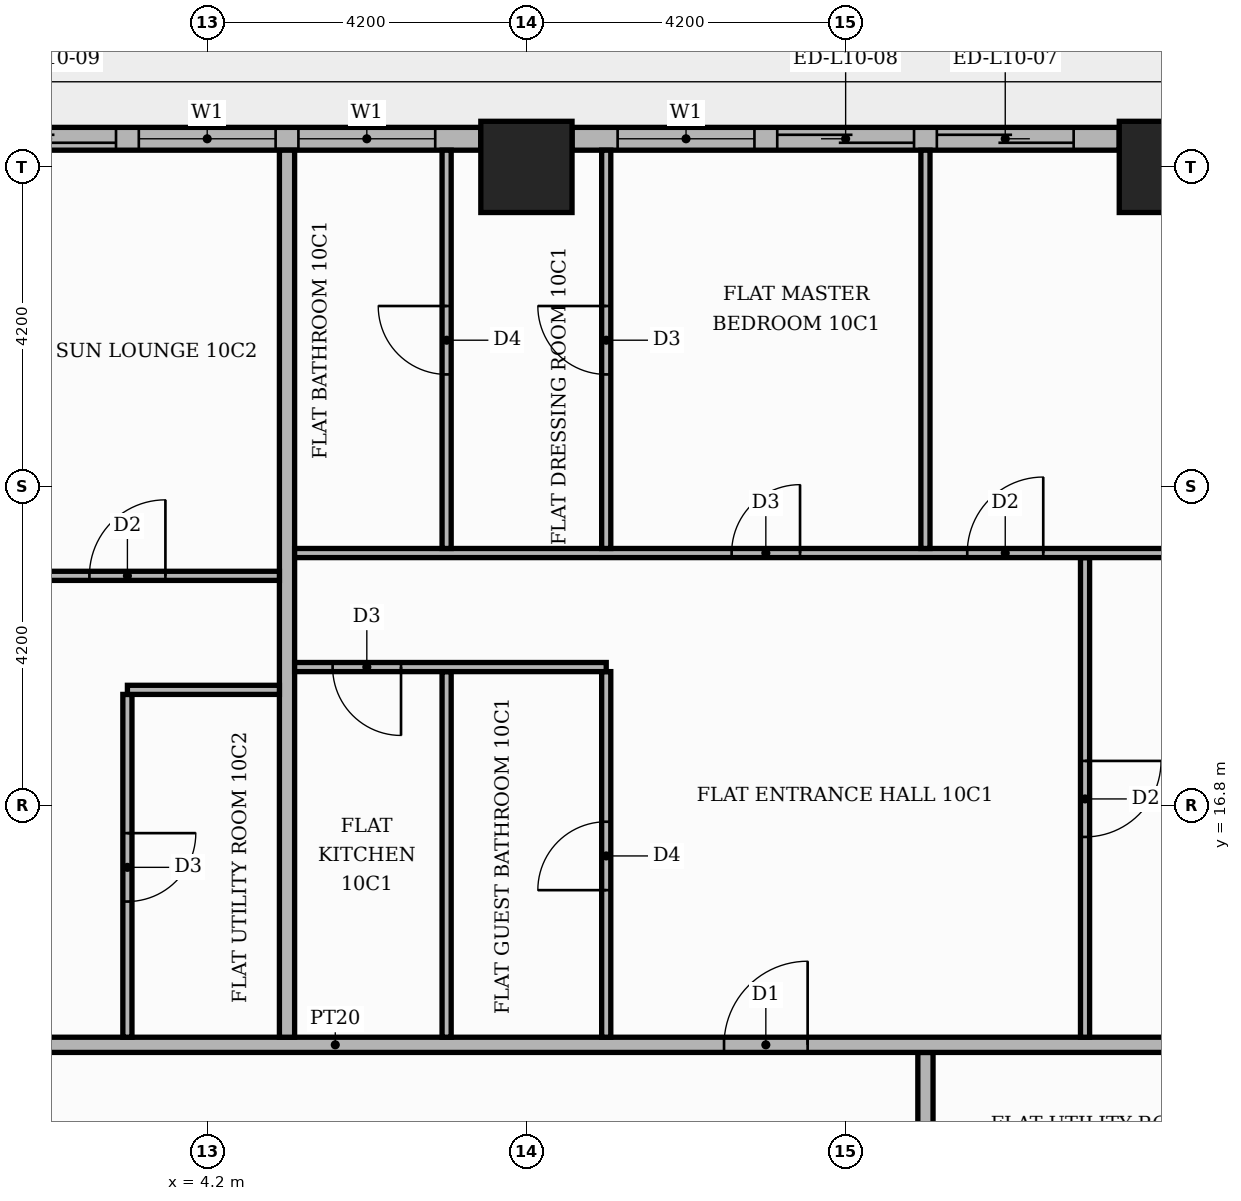
"""IFC4 building model, lengths in metres.
Left out: names, types, materials, properties, quantities, classifications, styles, units other than length and angle.
Written with IfcOpenShell. Run it as: python <this file> out.ifc"""

import sys

from ifc_helpers import new_model, si_unit, direction, frame, frame_2d, origin, origin_2d, place, context, subcontext, project, spatial, rectangle, extrude, element, fill, save


model = new_model("IFC4")
c1 = context("Model", 3, precision=1e-05, world=origin(), true_north=direction((0.0, 1.0)))
c2 = subcontext(c1, "Body", "Model", "MODEL_VIEW")
j1 = project(units=[si_unit("LENGTHUNIT", "METRE"), si_unit("PLANEANGLEUNIT", "RADIAN")], contexts=[c1])
p1 = place(None, origin())
s1 = spatial("IfcSite", under=j1, at=p1, CompositionType="ELEMENT")
p2 = place(p1, origin())
s2 = spatial("IfcBuilding", under=s1, at=p2, CompositionType="ELEMENT")
p3 = place(p2, frame((0.0, 0.0, 46.5)))
s3 = spatial("IfcBuildingStorey", under=s2, at=p3, CompositionType="ELEMENT", Elevation=46.5)
for number, where, z_axis, x_axis in (
    (1, (8.4, 25.2, 0.0), (0.0, 0.0, 1.0), (1.0, 0.0, 0.0)),
    (2, (16.8, 25.2, 0.0), (0.0, 0.0, 1.0), (1.0, 0.0, 0.0)),
):
    element("IfcColumn", number, at=place(p3, frame(where, z_axis=z_axis, x_axis=x_axis)), inside=s3, PredefinedType="COLUMN", context=c2, shape_type="SweptSolid", body=[
        extrude(rectangle(XDim=1.2, YDim=1.2, at=origin_2d()), origin(), (0.0, 0.0, 1.0), 3.9),
    ])
p4 = place(p3, frame((16.2, 25.57, 0.0), z_axis=(0.0, 0.0, 1.0), x_axis=(-1.0, 0.0, 0.0)))
e3 = element("IfcWall", 3, at=p4, inside=s3, PredefinedType="STANDARD", context=c2, shape_type="SweptSolid", body=[
    extrude(rectangle(XDim=7.2, YDim=0.3, at=frame_2d((3.6, 0.0))), origin(), (0.0, 0.0, 1.0), 3.48),
])
p5 = place(p4, frame((0.6, 0.0, 0.0)))
e4 = element("IfcOpeningElement", 4, at=p5, cuts=e3, PredefinedType="OPENING", context=c2, shape_type="SweptSolid", body=[
    extrude(rectangle(XDim=1.8, YDim=2.4, at=frame_2d((0.9, 1.2))), frame((0.0, 0.16, 0.0), z_axis=(0.0, -1.0, 0.0), x_axis=(1.0, 0.0, 0.0)), (0.0, 0.0, 1.0), 0.32),
])
p6 = place(p4, frame((2.7, 0.0, 0.0)))
e5 = element("IfcOpeningElement", 5, at=p6, cuts=e3, PredefinedType="OPENING", context=c2, shape_type="SweptSolid", body=[
    extrude(rectangle(XDim=1.8, YDim=2.4, at=frame_2d((0.9, 1.2))), frame((0.0, 0.16, 0.0), z_axis=(0.0, -1.0, 0.0), x_axis=(1.0, 0.0, 0.0)), (0.0, 0.0, 1.0), 0.32),
])
p7 = place(p4, frame((4.8, 0.0, 0.9)))
e6 = element("IfcOpeningElement", 6, at=p7, cuts=e3, PredefinedType="OPENING", context=c2, shape_type="SweptSolid", body=[
    extrude(rectangle(XDim=1.8, YDim=2.1, at=frame_2d((0.9, 1.05))), frame((0.0, 0.16, 0.0), z_axis=(0.0, -1.0, 0.0), x_axis=(1.0, 0.0, 0.0)), (0.0, 0.0, 1.0), 0.32),
])
p8 = place(p3, frame((7.8, 25.57, 0.0), z_axis=(0.0, 0.0, 1.0), x_axis=(-1.0, 0.0, 0.0)))
e7 = element("IfcWall", 7, at=p8, inside=s3, PredefinedType="STANDARD", context=c2, shape_type="SweptSolid", body=[
    extrude(rectangle(XDim=7.2, YDim=0.3, at=frame_2d((3.6, 0.0))), origin(), (0.0, 0.0, 1.0), 3.48),
])
p9 = place(p8, frame((0.6, 0.0, 0.9)))
e8 = element("IfcOpeningElement", 8, at=p9, cuts=e7, PredefinedType="OPENING", context=c2, shape_type="SweptSolid", body=[
    extrude(rectangle(XDim=1.8, YDim=2.1, at=frame_2d((0.9, 1.05))), frame((0.0, 0.16, 0.0), z_axis=(0.0, -1.0, 0.0), x_axis=(1.0, 0.0, 0.0)), (0.0, 0.0, 1.0), 0.32),
])
p10 = place(p8, frame((2.7, 0.0, 0.9)))
e9 = element("IfcOpeningElement", 9, at=p10, cuts=e7, PredefinedType="OPENING", context=c2, shape_type="SweptSolid", body=[
    extrude(rectangle(XDim=1.8, YDim=2.1, at=frame_2d((0.9, 1.05))), frame((0.0, 0.16, 0.0), z_axis=(0.0, -1.0, 0.0), x_axis=(1.0, 0.0, 0.0)), (0.0, 0.0, 1.0), 0.32),
])
p11 = place(p8, frame((4.8, 0.0, 0.0)))
e10 = element("IfcOpeningElement", 10, at=p11, cuts=e7, PredefinedType="OPENING", context=c2, shape_type="SweptSolid", body=[
    extrude(rectangle(XDim=1.8, YDim=2.4, at=frame_2d((0.9, 1.2))), frame((0.0, 0.16, 0.0), z_axis=(0.0, -1.0, 0.0), x_axis=(1.0, 0.0, 0.0)), (0.0, 0.0, 1.0), 0.32),
])
p12 = place(p3, frame((13.65, -13.55, 0.0), z_axis=(0.0, 0.0, 1.0), x_axis=(0.0, 1.0, 0.0)))
e11 = element("IfcWall", 11, at=p12, inside=s3, PredefinedType="PARTITIONING", context=c2, shape_type="SweptSolid", body=[
    extrude(rectangle(XDim=27.1, YDim=0.2, at=frame_2d((13.55, 0.0))), origin(), (0.0, 0.0, 1.0), 3.48),
])
p13 = place(p12, frame((2.5, 0.0, 0.0)))
e12 = element("IfcOpeningElement", 12, at=p13, cuts=e11, PredefinedType="OPENING", context=c2, shape_type="SweptSolid", body=[
    extrude(rectangle(XDim=1.1, YDim=2.4, at=frame_2d((0.55, 1.2))), frame((0.0, 0.11, 0.0), z_axis=(0.0, -1.0, 0.0), x_axis=(1.0, 0.0, 0.0)), (0.0, 0.0, 1.0), 0.22),
])
p14 = place(p3, frame((-13.65, 13.65, 0.0), z_axis=(0.0, 0.0, 1.0), x_axis=(1.0, 0.0, 0.0)))
e13 = element("IfcWall", 13, at=p14, inside=s3, PredefinedType="PARTITIONING", context=c2, shape_type="SweptSolid", body=[
    extrude(rectangle(XDim=39.07, YDim=0.2, at=frame_2d((19.535, 0.0))), origin(), (0.0, 0.0, 1.0), 3.48),
])
p15 = place(p14, frame((24.65, 0.0, 0.0)))
e14 = element("IfcOpeningElement", 14, at=p15, cuts=e13, PredefinedType="OPENING", context=c2, shape_type="SweptSolid", body=[
    extrude(rectangle(XDim=1.1, YDim=2.4, at=frame_2d((0.55, 1.2))), frame((0.0, 0.11, 0.0), z_axis=(0.0, -1.0, 0.0), x_axis=(1.0, 0.0, 0.0)), (0.0, 0.0, 1.0), 0.22),
])
p16 = place(p14, frame((14.15, 0.0, 0.0)))
e15 = element("IfcOpeningElement", 15, at=p16, cuts=e13, PredefinedType="OPENING", context=c2, shape_type="SweptSolid", body=[
    extrude(rectangle(XDim=1.1, YDim=2.4, at=frame_2d((0.55, 1.2))), frame((0.0, 0.11, 0.0), z_axis=(0.0, -1.0, 0.0), x_axis=(1.0, 0.0, 0.0)), (0.0, 0.0, 1.0), 0.22),
])
p17 = place(p3, frame((3.15, 13.75, 0.0), z_axis=(0.0, 0.0, 1.0), x_axis=(0.0, 1.0, 0.0)))
e16 = element("IfcWall", 16, at=p17, inside=s3, PredefinedType="PARTITIONING", context=c2, shape_type="SweptSolid", body=[
    extrude(rectangle(XDim=4.51, YDim=0.12, at=frame_2d((2.255, 0.0))), origin(), (0.0, 0.0, 1.0), 3.48),
])
p18 = place(p17, frame((1.785, 0.0, 0.0)))
e17 = element("IfcOpeningElement", 17, at=p18, cuts=e16, PredefinedType="OPENING", context=c2, shape_type="SweptSolid", body=[
    extrude(rectangle(XDim=0.9, YDim=2.1, at=frame_2d((0.45, 1.05))), frame((0.0, 0.07, 0.0), z_axis=(0.0, -1.0, 0.0), x_axis=(1.0, 0.0, 0.0)), (0.0, 0.0, 1.0), 0.14),
])
p19 = place(p3, frame((5.25, 13.75, 0.0), z_axis=(0.0, 0.0, 1.0), x_axis=(0.0, 1.0, 0.0)))
e18 = element("IfcWall", 18, at=p19, inside=s3, PredefinedType="PARTITIONING", context=c2, shape_type="SweptSolid", body=[
    extrude(rectangle(XDim=11.67, YDim=0.2, at=frame_2d((5.835, 0.0))), origin(), (0.0, 0.0, 1.0), 3.48),
])
p20 = place(p3, frame((7.35, 13.75, 0.0), z_axis=(0.0, 0.0, 1.0), x_axis=(0.0, 1.0, 0.0)))
e19 = element("IfcWall", 19, at=p20, inside=s3, PredefinedType="PARTITIONING", context=c2, shape_type="SweptSolid", body=[
    extrude(rectangle(XDim=4.81, YDim=0.12, at=frame_2d((2.405, 0.0))), origin(), (0.0, 0.0, 1.0), 3.48),
])
p21 = place(p3, frame((9.45, 13.75, 0.0), z_axis=(0.0, 0.0, 1.0), x_axis=(0.0, 1.0, 0.0)))
e20 = element("IfcWall", 20, at=p21, inside=s3, PredefinedType="PARTITIONING", context=c2, shape_type="SweptSolid", body=[
    extrude(rectangle(XDim=4.81, YDim=0.12, at=frame_2d((2.405, 0.0))), origin(), (0.0, 0.0, 1.0), 3.48),
])
p22 = place(p21, frame((1.935, 0.0, 0.0)))
e21 = element("IfcOpeningElement", 21, at=p22, cuts=e20, PredefinedType="OPENING", context=c2, shape_type="SweptSolid", body=[
    extrude(rectangle(XDim=0.9, YDim=2.1, at=frame_2d((0.45, 1.05))), frame((0.0, 0.07, 0.0), z_axis=(0.0, -1.0, 0.0), x_axis=(1.0, 0.0, 0.0)), (0.0, 0.0, 1.0), 0.14),
])
p23 = place(p3, frame((15.75, 13.75, 0.0), z_axis=(0.0, 0.0, 1.0), x_axis=(0.0, 1.0, 0.0)))
e22 = element("IfcWall", 22, at=p23, inside=s3, PredefinedType="PARTITIONING", context=c2, shape_type="SweptSolid", body=[
    extrude(rectangle(XDim=6.31, YDim=0.12, at=frame_2d((3.155, 0.0))), origin(), (0.0, 0.0, 1.0), 3.48),
])
p24 = place(p23, frame((2.635, 0.0, 0.0)))
e23 = element("IfcOpeningElement", 23, at=p24, cuts=e22, PredefinedType="OPENING", context=c2, shape_type="SweptSolid", body=[
    extrude(rectangle(XDim=1.0, YDim=2.1, at=frame_2d((0.5, 1.05))), frame((0.0, 0.07, 0.0), z_axis=(0.0, -1.0, 0.0), x_axis=(1.0, 0.0, 0.0)), (0.0, 0.0, 1.0), 0.14),
])
p25 = place(p3, frame((3.15, 18.32, 0.0), z_axis=(0.0, 0.0, 1.0), x_axis=(1.0, 0.0, 0.0)))
e24 = element("IfcWall", 24, at=p25, inside=s3, PredefinedType="PARTITIONING", context=c2, shape_type="SweptSolid", body=[
    extrude(rectangle(XDim=2.0, YDim=0.12, at=frame_2d((1.0, 0.0))), origin(), (0.0, 0.0, 1.0), 3.48),
])
p26 = place(p3, frame((5.35, 18.62, 0.0), z_axis=(0.0, 0.0, 1.0), x_axis=(1.0, 0.0, 0.0)))
e25 = element("IfcWall", 25, at=p26, inside=s3, PredefinedType="PARTITIONING", context=c2, shape_type="SweptSolid", body=[
    extrude(rectangle(XDim=4.1, YDim=0.12, at=frame_2d((2.05, 0.0))), origin(), (0.0, 0.0, 1.0), 3.48),
])
p27 = place(p26, frame((0.5, 0.0, 0.0)))
e26 = element("IfcOpeningElement", 26, at=p27, cuts=e25, PredefinedType="OPENING", context=c2, shape_type="SweptSolid", body=[
    extrude(rectangle(XDim=0.9, YDim=2.1, at=frame_2d((0.45, 1.05))), frame((0.0, 0.07, 0.0), z_axis=(0.0, -1.0, 0.0), x_axis=(1.0, 0.0, 0.0)), (0.0, 0.0, 1.0), 0.14),
])
p28 = place(p3, frame((-13.55, 19.82, 0.0), z_axis=(0.0, 0.0, 1.0), x_axis=(1.0, 0.0, 0.0)))
e27 = element("IfcWall", 27, at=p28, inside=s3, PredefinedType="PARTITIONING", context=c2, shape_type="SweptSolid", body=[
    extrude(rectangle(XDim=18.7, YDim=0.12, at=frame_2d((9.35, 0.0))), origin(), (0.0, 0.0, 1.0), 3.48),
])
p29 = place(p28, frame((16.2, 0.0, 0.0)))
e28 = element("IfcOpeningElement", 28, at=p29, cuts=e27, PredefinedType="OPENING", context=c2, shape_type="SweptSolid", body=[
    extrude(rectangle(XDim=1.0, YDim=2.1, at=frame_2d((0.5, 1.05))), frame((0.0, 0.07, 0.0), z_axis=(0.0, -1.0, 0.0), x_axis=(1.0, 0.0, 0.0)), (0.0, 0.0, 1.0), 0.14),
])
p30 = place(p28, frame((12.05, 0.0, 0.0)))
e29 = element("IfcOpeningElement", 29, at=p30, cuts=e27, PredefinedType="OPENING", context=c2, shape_type="SweptSolid", body=[
    extrude(rectangle(XDim=0.9, YDim=2.1, at=frame_2d((0.45, 1.05))), frame((0.0, 0.07, 0.0), z_axis=(0.0, -1.0, 0.0), x_axis=(1.0, 0.0, 0.0)), (0.0, 0.0, 1.0), 0.14),
])
p31 = place(p28, frame((3.65, 0.0, 0.0)))
e30 = element("IfcOpeningElement", 30, at=p31, cuts=e27, PredefinedType="OPENING", context=c2, shape_type="SweptSolid", body=[
    extrude(rectangle(XDim=0.9, YDim=2.1, at=frame_2d((0.45, 1.05))), frame((0.0, 0.07, 0.0), z_axis=(0.0, -1.0, 0.0), x_axis=(1.0, 0.0, 0.0)), (0.0, 0.0, 1.0), 0.14),
])
p32 = place(p3, frame((5.35, 20.12, 0.0), z_axis=(0.0, 0.0, 1.0), x_axis=(1.0, 0.0, 0.0)))
e31 = element("IfcWall", 31, at=p32, inside=s3, PredefinedType="PARTITIONING", context=c2, shape_type="SweptSolid", body=[
    extrude(rectangle(XDim=11.95, YDim=0.12, at=frame_2d((5.975, 0.0))), origin(), (0.0, 0.0, 1.0), 3.48),
])
p33 = place(p32, frame((8.85, 0.0, 0.0)))
e32 = element("IfcOpeningElement", 32, at=p33, cuts=e31, PredefinedType="OPENING", context=c2, shape_type="SweptSolid", body=[
    extrude(rectangle(XDim=1.0, YDim=2.1, at=frame_2d((0.5, 1.05))), frame((0.0, 0.07, 0.0), z_axis=(0.0, -1.0, 0.0), x_axis=(1.0, 0.0, 0.0)), (0.0, 0.0, 1.0), 0.14),
])
p34 = place(p32, frame((5.75, 0.0, 0.0)))
e33 = element("IfcOpeningElement", 33, at=p34, cuts=e31, PredefinedType="OPENING", context=c2, shape_type="SweptSolid", body=[
    extrude(rectangle(XDim=0.9, YDim=2.1, at=frame_2d((0.45, 1.05))), frame((0.0, 0.07, 0.0), z_axis=(0.0, -1.0, 0.0), x_axis=(1.0, 0.0, 0.0)), (0.0, 0.0, 1.0), 0.14),
])
p35 = place(p3, frame((7.35, 20.18, 0.0), z_axis=(0.0, 0.0, 1.0), x_axis=(0.0, 1.0, 0.0)))
e34 = element("IfcWall", 34, at=p35, inside=s3, PredefinedType="PARTITIONING", context=c2, shape_type="SweptSolid", body=[
    extrude(rectangle(XDim=5.24, YDim=0.12, at=frame_2d((2.62, 0.0))), origin(), (0.0, 0.0, 1.0), 3.48),
])
p36 = place(p35, frame((2.29, 0.0, 0.0)))
e35 = element("IfcOpeningElement", 35, at=p36, cuts=e34, PredefinedType="OPENING", context=c2, shape_type="SweptSolid", body=[
    extrude(rectangle(XDim=0.9, YDim=2.1, at=frame_2d((0.45, 1.05))), frame((0.0, 0.07, 0.0), z_axis=(0.0, -1.0, 0.0), x_axis=(1.0, 0.0, 0.0)), (0.0, 0.0, 1.0), 0.14),
])
p37 = place(p3, frame((9.45, 20.18, 0.0), z_axis=(0.0, 0.0, 1.0), x_axis=(0.0, 1.0, 0.0)))
e36 = element("IfcWall", 36, at=p37, inside=s3, PredefinedType="PARTITIONING", context=c2, shape_type="SweptSolid", body=[
    extrude(rectangle(XDim=5.24, YDim=0.12, at=frame_2d((2.62, 0.0))), origin(), (0.0, 0.0, 1.0), 3.48),
])
p38 = place(p37, frame((2.29, 0.0, 0.0)))
e37 = element("IfcOpeningElement", 37, at=p38, cuts=e36, PredefinedType="OPENING", context=c2, shape_type="SweptSolid", body=[
    extrude(rectangle(XDim=0.9, YDim=2.1, at=frame_2d((0.45, 1.05))), frame((0.0, 0.07, 0.0), z_axis=(0.0, -1.0, 0.0), x_axis=(1.0, 0.0, 0.0)), (0.0, 0.0, 1.0), 0.14),
])
p39 = place(p3, frame((13.65, 20.18, 0.0), z_axis=(0.0, 0.0, 1.0), x_axis=(0.0, 1.0, 0.0)))
e38 = element("IfcWall", 38, at=p39, inside=s3, PredefinedType="PARTITIONING", context=c2, shape_type="SweptSolid", body=[
    extrude(rectangle(XDim=5.24, YDim=0.12, at=frame_2d((2.62, 0.0))), origin(), (0.0, 0.0, 1.0), 3.48),
])
p40 = place(p5, origin())
e39 = element("IfcDoor", 39, at=p40, inside=s3, OperationType="SLIDING_TO_LEFT", PredefinedType="DOOR", context=c2, shape_type="SweptSolid", body=[
    extrude(rectangle(XDim=1.8, YDim=2.4, at=frame_2d((0.9, 1.2))), frame((0.0, 0.025, 0.0), z_axis=(0.0, -1.0, 0.0), x_axis=(1.0, 0.0, 0.0)), (0.0, 0.0, 1.0), 0.05),
])
fill(e4, e39)
p41 = place(p6, origin())
e40 = element("IfcDoor", 40, at=p41, inside=s3, OperationType="SLIDING_TO_RIGHT", PredefinedType="DOOR", context=c2, shape_type="SweptSolid", body=[
    extrude(rectangle(XDim=1.8, YDim=2.4, at=frame_2d((0.9, 1.2))), frame((0.0, 0.025, 0.0), z_axis=(0.0, -1.0, 0.0), x_axis=(1.0, 0.0, 0.0)), (0.0, 0.0, 1.0), 0.05),
])
fill(e5, e40)
p42 = place(p7, origin())
e41 = element("IfcWindow", 41, at=p42, inside=s3, PartitioningType="SINGLE_PANEL", PredefinedType="WINDOW", context=c2, shape_type="SweptSolid", body=[
    extrude(rectangle(XDim=1.8, YDim=2.1, at=frame_2d((0.9, 1.05))), frame((0.0, 0.03, 0.0), z_axis=(0.0, -1.0, 0.0), x_axis=(1.0, 0.0, 0.0)), (0.0, 0.0, 1.0), 0.06),
])
fill(e6, e41)
p43 = place(p9, origin())
e42 = element("IfcWindow", 42, at=p43, inside=s3, PartitioningType="SINGLE_PANEL", PredefinedType="WINDOW", context=c2, shape_type="SweptSolid", body=[
    extrude(rectangle(XDim=1.8, YDim=2.1, at=frame_2d((0.9, 1.05))), frame((0.0, 0.03, 0.0), z_axis=(0.0, -1.0, 0.0), x_axis=(1.0, 0.0, 0.0)), (0.0, 0.0, 1.0), 0.06),
])
fill(e8, e42)
p44 = place(p10, origin())
e43 = element("IfcWindow", 43, at=p44, inside=s3, PartitioningType="SINGLE_PANEL", PredefinedType="WINDOW", context=c2, shape_type="SweptSolid", body=[
    extrude(rectangle(XDim=1.8, YDim=2.1, at=frame_2d((0.9, 1.05))), frame((0.0, 0.03, 0.0), z_axis=(0.0, -1.0, 0.0), x_axis=(1.0, 0.0, 0.0)), (0.0, 0.0, 1.0), 0.06),
])
fill(e9, e43)
p45 = place(p11, origin())
e44 = element("IfcDoor", 44, at=p45, inside=s3, OperationType="SLIDING_TO_RIGHT", PredefinedType="DOOR", context=c2, shape_type="SweptSolid", body=[
    extrude(rectangle(XDim=1.8, YDim=2.4, at=frame_2d((0.9, 1.2))), frame((0.0, 0.025, 0.0), z_axis=(0.0, -1.0, 0.0), x_axis=(1.0, 0.0, 0.0)), (0.0, 0.0, 1.0), 0.05),
])
fill(e10, e44)
p46 = place(p15, origin())
e45 = element("IfcDoor", 45, at=p46, inside=s3, OperationType="SINGLE_SWING_RIGHT", PredefinedType="DOOR", context=c2, shape_type="SweptSolid", body=[
    extrude(rectangle(XDim=1.1, YDim=2.4, at=frame_2d((0.55, 1.2))), frame((0.0, 0.025, 0.0), z_axis=(0.0, -1.0, 0.0), x_axis=(1.0, 0.0, 0.0)), (0.0, 0.0, 1.0), 0.05),
])
fill(e14, e45)
p47 = place(p24, frame((1.0, 0.0, 0.0), z_axis=(0.0, 0.0, 1.0), x_axis=(-1.0, 0.0, 0.0)))
e46 = element("IfcDoor", 46, at=p47, inside=s3, OperationType="SINGLE_SWING_RIGHT", PredefinedType="DOOR", context=c2, shape_type="SweptSolid", body=[
    extrude(rectangle(XDim=1.0, YDim=2.1, at=frame_2d((0.5, 1.05))), frame((0.0, 0.025, 0.0), z_axis=(0.0, -1.0, 0.0), x_axis=(1.0, 0.0, 0.0)), (0.0, 0.0, 1.0), 0.05),
])
fill(e23, e46)
p48 = place(p22, origin())
e47 = element("IfcDoor", 47, at=p48, inside=s3, OperationType="SINGLE_SWING_LEFT", PredefinedType="DOOR", context=c2, shape_type="SweptSolid", body=[
    extrude(rectangle(XDim=0.9, YDim=2.1, at=frame_2d((0.45, 1.05))), frame((0.0, 0.025, 0.0), z_axis=(0.0, -1.0, 0.0), x_axis=(1.0, 0.0, 0.0)), (0.0, 0.0, 1.0), 0.05),
])
fill(e21, e47)
p49 = place(p27, frame((0.9, 0.0, 0.0), z_axis=(0.0, 0.0, 1.0), x_axis=(-1.0, 0.0, 0.0)))
e48 = element("IfcDoor", 48, at=p49, inside=s3, OperationType="SINGLE_SWING_RIGHT", PredefinedType="DOOR", context=c2, shape_type="SweptSolid", body=[
    extrude(rectangle(XDim=0.9, YDim=2.1, at=frame_2d((0.45, 1.05))), frame((0.0, 0.025, 0.0), z_axis=(0.0, -1.0, 0.0), x_axis=(1.0, 0.0, 0.0)), (0.0, 0.0, 1.0), 0.05),
])
fill(e26, e48)
p50 = place(p33, origin())
e49 = element("IfcDoor", 49, at=p50, inside=s3, OperationType="SINGLE_SWING_RIGHT", PredefinedType="DOOR", context=c2, shape_type="SweptSolid", body=[
    extrude(rectangle(XDim=1.0, YDim=2.1, at=frame_2d((0.5, 1.05))), frame((0.0, 0.025, 0.0), z_axis=(0.0, -1.0, 0.0), x_axis=(1.0, 0.0, 0.0)), (0.0, 0.0, 1.0), 0.05),
])
fill(e32, e49)
p51 = place(p34, origin())
e50 = element("IfcDoor", 50, at=p51, inside=s3, OperationType="SINGLE_SWING_RIGHT", PredefinedType="DOOR", context=c2, shape_type="SweptSolid", body=[
    extrude(rectangle(XDim=0.9, YDim=2.1, at=frame_2d((0.45, 1.05))), frame((0.0, 0.025, 0.0), z_axis=(0.0, -1.0, 0.0), x_axis=(1.0, 0.0, 0.0)), (0.0, 0.0, 1.0), 0.05),
])
fill(e33, e50)
p52 = place(p38, origin())
e51 = element("IfcDoor", 51, at=p52, inside=s3, OperationType="SINGLE_SWING_RIGHT", PredefinedType="DOOR", context=c2, shape_type="SweptSolid", body=[
    extrude(rectangle(XDim=0.9, YDim=2.1, at=frame_2d((0.45, 1.05))), frame((0.0, 0.025, 0.0), z_axis=(0.0, -1.0, 0.0), x_axis=(1.0, 0.0, 0.0)), (0.0, 0.0, 1.0), 0.05),
])
fill(e37, e51)
p53 = place(p36, origin())
e52 = element("IfcDoor", 52, at=p53, inside=s3, OperationType="SINGLE_SWING_RIGHT", PredefinedType="DOOR", context=c2, shape_type="SweptSolid", body=[
    extrude(rectangle(XDim=0.9, YDim=2.1, at=frame_2d((0.45, 1.05))), frame((0.0, 0.025, 0.0), z_axis=(0.0, -1.0, 0.0), x_axis=(1.0, 0.0, 0.0)), (0.0, 0.0, 1.0), 0.05),
])
fill(e35, e52)
p54 = place(p18, frame((0.9, 0.0, 0.0), z_axis=(0.0, 0.0, 1.0), x_axis=(-1.0, 0.0, 0.0)))
e53 = element("IfcDoor", 53, at=p54, inside=s3, OperationType="SINGLE_SWING_RIGHT", PredefinedType="DOOR", context=c2, shape_type="SweptSolid", body=[
    extrude(rectangle(XDim=0.9, YDim=2.1, at=frame_2d((0.45, 1.05))), frame((0.0, 0.025, 0.0), z_axis=(0.0, -1.0, 0.0), x_axis=(1.0, 0.0, 0.0)), (0.0, 0.0, 1.0), 0.05),
])
fill(e17, e53)
p55 = place(p29, origin())
e54 = element("IfcDoor", 54, at=p55, inside=s3, OperationType="SINGLE_SWING_RIGHT", PredefinedType="DOOR", context=c2, shape_type="SweptSolid", body=[
    extrude(rectangle(XDim=1.0, YDim=2.1, at=frame_2d((0.5, 1.05))), frame((0.0, 0.025, 0.0), z_axis=(0.0, -1.0, 0.0), x_axis=(1.0, 0.0, 0.0)), (0.0, 0.0, 1.0), 0.05),
])
fill(e28, e54)
save(model, sys.argv[1])
